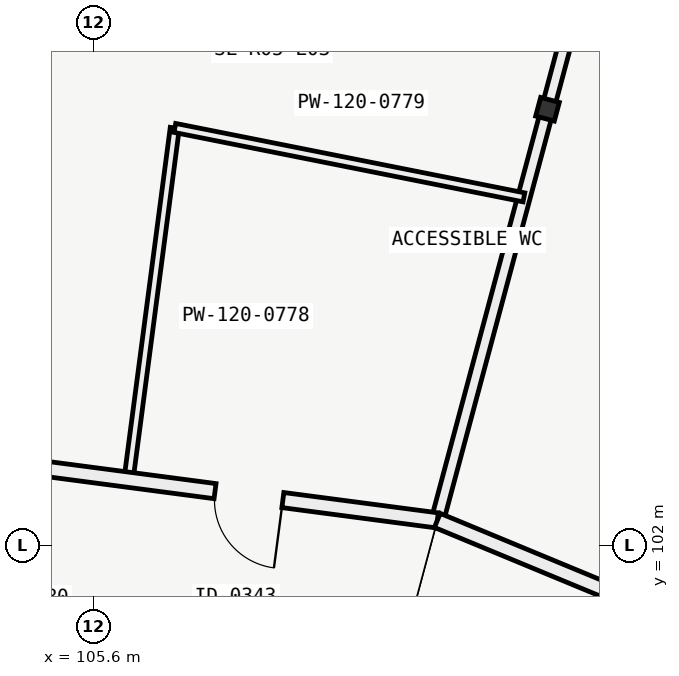
"""IFC4 building model, lengths in metres.
Left out: names, types, materials, properties, quantities, classifications, styles, units other than length and angle.
Written with IfcOpenShell. Run it as: python <this file> out.ifc"""

import sys

from ifc_helpers import new_model, si_unit, direction, frame, frame_2d, origin, origin_2d, place, context, subcontext, project, spatial, rectangle, i_section, extrude, element, fill, save


model = new_model("IFC4")
c1 = context("Model", 3, precision=1e-05, world=origin(), true_north=direction((0.0, 1.0)))
c2 = subcontext(c1, "Body", "Model", "MODEL_VIEW")
j1 = project(units=[si_unit("LENGTHUNIT", "METRE"), si_unit("PLANEANGLEUNIT", "RADIAN")], contexts=[c1])
p1 = place(None, origin())
s1 = spatial("IfcSite", under=j1, at=p1, CompositionType="ELEMENT")
p2 = place(p1, origin())
s2 = spatial("IfcBuilding", under=s1, at=p2, CompositionType="ELEMENT")
p3 = place(p2, frame((0.0, 0.0, 13.8)))
s3 = spatial("IfcBuildingStorey", under=s2, at=p3, CompositionType="ELEMENT", Elevation=13.8)
p4 = place(p3, frame((111.576, 107.739, 0.0), z_axis=(0.0, 0.0, 1.0), x_axis=(0.258819045103, 0.965925826289, 0.0)))
e1 = element("IfcColumn", 1, at=p4, inside=s3, PredefinedType="COLUMN", context=c2, shape_type="SweptSolid", body=[
    extrude(i_section(OverallWidth=0.254, OverallDepth=0.254, WebThickness=0.009, FlangeThickness=0.014, FilletRadius=0.014, at=origin_2d()), origin(), (0.0, 0.0, 1.0), 4.2),
])
p5 = place(p3, frame((110.127, 102.33, 0.0), z_axis=(0.0, 0.0, 1.0), x_axis=(0.258810530041, 0.965928107853, 0.0)))
e2 = element("IfcWall", 2, at=p5, inside=s3, PredefinedType="PARTITIONING", context=c2, shape_type="SweptSolid", body=[
    extrude(rectangle(XDim=14.48, YDim=0.165, at=frame_2d((7.24, 0.0))), origin(), (0.0, 0.0, 1.0), 3.85),
])
p6 = place(p3, frame((106.063, 102.865, 0.0), z_axis=(0.0, 0.0, 1.0), x_axis=(0.130526207551, 0.991444859356, 0.0)))
e3 = element("IfcWall", 3, at=p6, inside=s3, PredefinedType="PARTITIONING", context=c2, shape_type="SweptSolid", body=[
    extrude(rectangle(XDim=4.669, YDim=0.12, at=frame_2d((2.334, 0.0))), origin(), (0.0, 0.0, 1.0), 3.85),
])
p7 = place(p3, frame((111.266, 106.58, 0.0), z_axis=(0.0, 0.0, 1.0), x_axis=(-0.980784676414, 0.195093358449, 0.0)))
e4 = element("IfcWall", 4, at=p7, inside=s3, PredefinedType="PARTITIONING", context=c2, shape_type="SweptSolid", body=[
    extrude(rectangle(XDim=4.683, YDim=0.12, at=frame_2d((2.341, 0.0))), origin(), (0.0, 0.0, 1.0), 3.85),
])
p8 = place(p3, frame((110.127, 102.33, 0.0), z_axis=(0.0, 0.0, 1.0), x_axis=(-0.991446589332, 0.130513066404, 0.0)))
e5 = element("IfcWall", 5, at=p8, inside=s3, PredefinedType="PARTITIONING", context=c2, shape_type="SweptSolid", body=[
    extrude(rectangle(XDim=8.197, YDim=0.2, at=frame_2d((4.099, 0.0))), origin(), (0.0, 0.0, 1.0), 3.85),
])
p9 = place(p8, frame((2.05, 0.0, 0.0)))
e6 = element("IfcOpeningElement", 6, at=p9, cuts=e5, PredefinedType="OPENING", context=c2, shape_type="SweptSolid", body=[
    extrude(rectangle(XDim=0.9, YDim=2.05, at=frame_2d((0.45, 1.025))), frame((0.0, 0.11, 0.0), z_axis=(0.0, -1.0, 0.0), x_axis=(1.0, 0.0, 0.0)), (0.0, 0.0, 1.0), 0.22),
])
p10 = place(p8, frame((6.15, 0.0, 0.0)))
e7 = element("IfcOpeningElement", 7, at=p10, cuts=e5, PredefinedType="OPENING", context=c2, shape_type="SweptSolid", body=[
    extrude(rectangle(XDim=1.4, YDim=2.2, at=frame_2d((0.7, 1.1))), frame((0.0, 0.11, 0.0), z_axis=(0.0, -1.0, 0.0), x_axis=(1.0, 0.0, 0.0)), (0.0, 0.0, 1.0), 0.22),
])
p11 = place(p3, frame((117.7, 99.193, 0.0), z_axis=(0.0, 0.0, 1.0), x_axis=(-0.923874167149, 0.382696385238, 0.0)))
e8 = element("IfcWall", 8, at=p11, inside=s3, PredefinedType="PARTITIONING", context=c2, shape_type="SweptSolid", body=[
    extrude(rectangle(XDim=8.197, YDim=0.2, at=frame_2d((4.099, 0.0))), origin(), (0.0, 0.0, 1.0), 3.85),
])
p12 = place(p9, origin())
e9 = element("IfcDoor", 9, at=p12, inside=s3, OperationType="SINGLE_SWING_LEFT", PredefinedType="DOOR", context=c2, shape_type="SweptSolid", body=[
    extrude(rectangle(XDim=0.9, YDim=2.05, at=frame_2d((0.45, 1.025))), frame((0.0, 0.025, 0.0), z_axis=(0.0, -1.0, 0.0), x_axis=(1.0, 0.0, 0.0)), (0.0, 0.0, 1.0), 0.05),
])
fill(e6, e9)
save(model, sys.argv[1])
